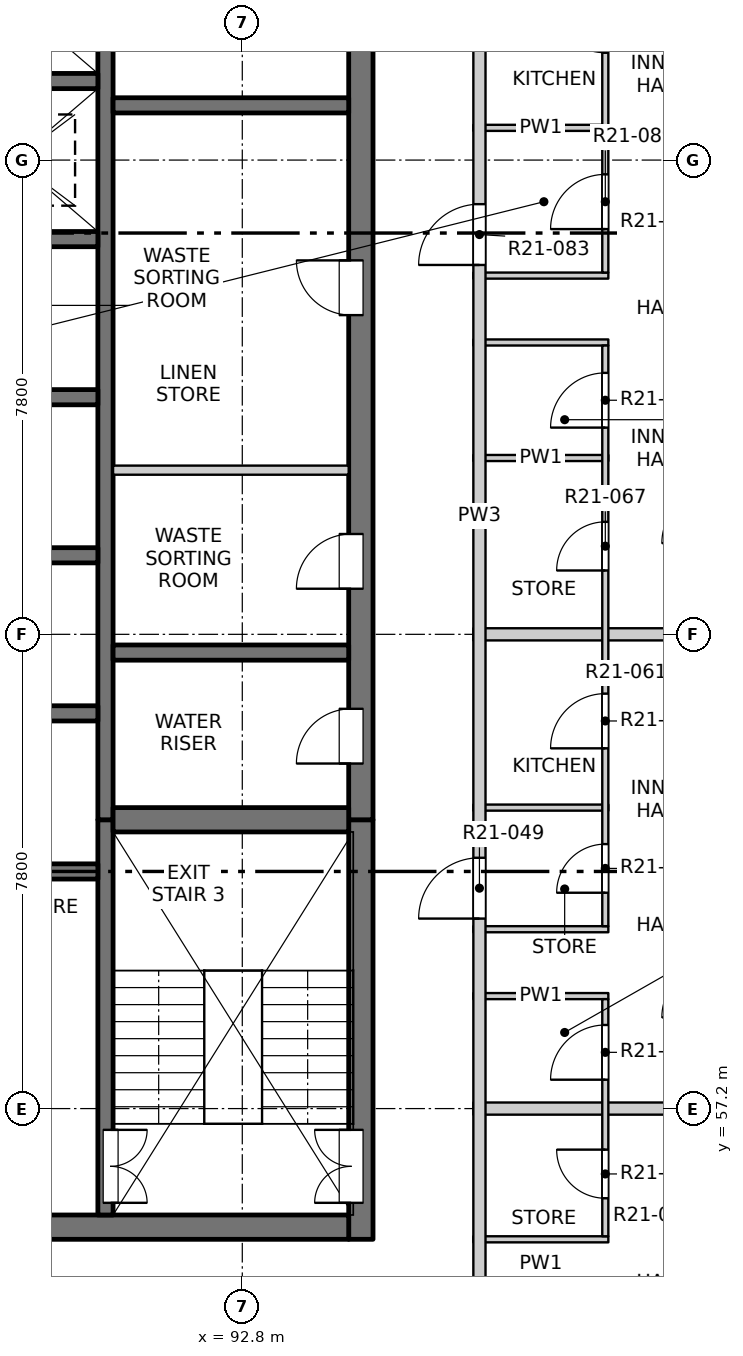
"""IFC4 building model, lengths in metres.
Left out: names, types, materials, properties, quantities, classifications, styles, units other than length and angle.
Written with IfcOpenShell. Run it as: python <this file> out.ifc"""

import sys

from ifc_helpers import new_model, si_unit, direction, frame, frame_2d, origin, place, context, subcontext, project, spatial, rectangle, extrude, element, fill, save


model = new_model("IFC4")
c1 = context("Model", 3, precision=1e-05, world=origin(), true_north=direction((0.0, 1.0)))
c2 = subcontext(c1, "Body", "Model", "MODEL_VIEW")
j1 = project(units=[si_unit("LENGTHUNIT", "METRE"), si_unit("PLANEANGLEUNIT", "RADIAN")], contexts=[c1])
p1 = place(None, origin())
s1 = spatial("IfcSite", under=j1, at=p1, CompositionType="ELEMENT")
p2 = place(p1, origin())
s2 = spatial("IfcBuilding", under=s1, at=p2, CompositionType="ELEMENT")
p3 = place(p2, frame((0.0, 0.0, 221.1)))
s3 = spatial("IfcBuildingStorey", under=s2, at=p3, CompositionType="ELEMENT", Elevation=221.1)
p4 = place(p3, frame((94.75, 55.05, -0.25), z_axis=(0.0, 0.0, 1.0), x_axis=(0.0, 1.0, 0.0)))
e1 = element("IfcWall", 1, at=p4, inside=s3, PredefinedType="SOLIDWALL", context=c2, shape_type="SweptSolid", body=[
    extrude(rectangle(XDim=6.9, YDim=0.4, at=frame_2d((3.45, 0.0))), origin(), (0.0, 0.0, 1.0), 3.4),
])
p5 = place(p4, frame((0.6, 0.0, 0.25)))
e2 = element("IfcOpeningElement", 2, at=p5, cuts=e1, PredefinedType="OPENING", context=c2, shape_type="SweptSolid", body=[
    extrude(rectangle(XDim=1.2, YDim=2.1, at=frame_2d((0.6, 1.05))), frame((0.0, 0.21, 0.0), z_axis=(0.0, -1.0, 0.0), x_axis=(1.0, 0.0, 0.0)), (0.0, 0.0, 1.0), 0.42),
])
p6 = place(p3, frame((94.75, 61.95, -0.25), z_axis=(0.0, 0.0, 1.0), x_axis=(0.0, 1.0, 0.0)))
e3 = element("IfcWall", 3, at=p6, inside=s3, PredefinedType="SOLIDWALL", context=c2, shape_type="SweptSolid", body=[
    extrude(rectangle(XDim=15.35, YDim=0.4, at=frame_2d((7.675, 0.0))), origin(), (0.0, 0.0, 1.0), 3.4),
])
p7 = place(p6, frame((0.925, 0.0, 0.25)))
e4 = element("IfcOpeningElement", 4, at=p7, cuts=e3, PredefinedType="OPENING", context=c2, shape_type="SweptSolid", body=[
    extrude(rectangle(XDim=0.9, YDim=2.1, at=frame_2d((0.45, 1.05))), frame((0.0, 0.21, 0.0), z_axis=(0.0, -1.0, 0.0), x_axis=(1.0, 0.0, 0.0)), (0.0, 0.0, 1.0), 0.42),
])
p8 = place(p6, frame((3.8, 0.0, 0.25)))
e5 = element("IfcOpeningElement", 5, at=p8, cuts=e3, PredefinedType="OPENING", context=c2, shape_type="SweptSolid", body=[
    extrude(rectangle(XDim=0.9, YDim=2.1, at=frame_2d((0.45, 1.05))), frame((0.0, 0.21, 0.0), z_axis=(0.0, -1.0, 0.0), x_axis=(1.0, 0.0, 0.0)), (0.0, 0.0, 1.0), 0.42),
])
p9 = place(p6, frame((8.3, 0.0, 0.25)))
e6 = element("IfcOpeningElement", 6, at=p9, cuts=e3, PredefinedType="OPENING", context=c2, shape_type="SweptSolid", body=[
    extrude(rectangle(XDim=0.9, YDim=2.1, at=frame_2d((0.45, 1.05))), frame((0.0, 0.21, 0.0), z_axis=(0.0, -1.0, 0.0), x_axis=(1.0, 0.0, 0.0)), (0.0, 0.0, 1.0), 0.42),
])
p10 = place(p6, frame((13.1, 0.0, 0.25)))
e7 = element("IfcOpeningElement", 7, at=p10, cuts=e3, PredefinedType="OPENING", context=c2, shape_type="SweptSolid", body=[
    extrude(rectangle(XDim=0.9, YDim=2.1, at=frame_2d((0.45, 1.05))), frame((0.0, 0.21, 0.0), z_axis=(0.0, -1.0, 0.0), x_axis=(1.0, 0.0, 0.0)), (0.0, 0.0, 1.0), 0.42),
])
p11 = place(p3, frame((75.45, 55.25, -0.25), z_axis=(0.0, 0.0, 1.0), x_axis=(1.0, 0.0, 0.0)))
e8 = element("IfcWall", 8, at=p11, inside=s3, PredefinedType="SOLIDWALL", context=c2, shape_type="SweptSolid", body=[
    extrude(rectangle(XDim=19.1, YDim=0.4, at=frame_2d((9.55, 0.0))), origin(), (0.0, 0.0, 1.0), 3.4),
])
p12 = place(p11, frame((8.8, 0.0, 0.25)))
e9 = element("IfcOpeningElement", 9, at=p12, cuts=e8, PredefinedType="OPENING", context=c2, shape_type="SweptSolid", body=[
    extrude(rectangle(XDim=1.5, YDim=2.1, at=frame_2d((0.75, 1.05))), frame((0.0, 0.21, 0.0), z_axis=(0.0, -1.0, 0.0), x_axis=(1.0, 0.0, 0.0)), (0.0, 0.0, 1.0), 0.42),
])
p13 = place(p3, frame((90.55, 55.45, -0.25), z_axis=(0.0, 0.0, 1.0), x_axis=(0.0, 1.0, 0.0)))
e10 = element("IfcWall", 10, at=p13, inside=s3, PredefinedType="SOLIDWALL", context=c2, shape_type="SweptSolid", body=[
    extrude(rectangle(XDim=6.5, YDim=0.25, at=frame_2d((3.25, 0.0))), origin(), (0.0, 0.0, 1.0), 3.4),
])
p14 = place(p13, frame((0.2, 0.0, 0.25)))
e11 = element("IfcOpeningElement", 11, at=p14, cuts=e10, PredefinedType="OPENING", context=c2, shape_type="SweptSolid", body=[
    extrude(rectangle(XDim=1.2, YDim=2.1, at=frame_2d((0.6, 1.05))), frame((0.0, 0.135, 0.0), z_axis=(0.0, -1.0, 0.0), x_axis=(1.0, 0.0, 0.0)), (0.0, 0.0, 1.0), 0.27),
])
p15 = place(p3, frame((90.55, 61.95, -0.25), z_axis=(0.0, 0.0, 1.0), x_axis=(0.0, 1.0, 0.0)))
e12 = element("IfcWall", 12, at=p15, inside=s3, PredefinedType="SOLIDWALL", context=c2, shape_type="SweptSolid", body=[
    extrude(rectangle(XDim=15.35, YDim=0.25, at=frame_2d((7.675, 0.0))), origin(), (0.0, 0.0, 1.0), 3.4),
])
for number, where, z_axis, x_axis in (
    (13, (87.425, 61.1, -0.25), (0.0, 0.0, 1.0), (1.0, 0.0, 0.0)),
    (14, (87.425, 63.7, -0.25), (0.0, 0.0, 1.0), (1.0, 0.0, 0.0)),
    (15, (87.425, 66.3, -0.25), (0.0, 0.0, 1.0), (1.0, 0.0, 0.0)),
    (16, (87.425, 68.9, -0.25), (0.0, 0.0, 1.0), (1.0, 0.0, 0.0)),
    (17, (87.425, 71.5, -0.25), (0.0, 0.0, 1.0), (1.0, 0.0, 0.0)),
    (18, (87.425, 74.1, -0.25), (0.0, 0.0, 1.0), (1.0, 0.0, 0.0)),
):
    element("IfcWall", number, at=place(p3, frame(where, z_axis=z_axis, x_axis=x_axis)), inside=s3, PredefinedType="SOLIDWALL", context=c2, shape_type="SweptSolid", body=[
        extrude(rectangle(XDim=3.0, YDim=0.25, at=frame_2d((1.5, 0.0))), origin(), (0.0, 0.0, 1.0), 3.4),
    ])
p16 = place(p3, frame((90.675, 61.95, -0.25), z_axis=(0.0, 0.0, 1.0), x_axis=(1.0, 0.0, 0.0)))
e19 = element("IfcWall", 19, at=p16, inside=s3, PredefinedType="SOLIDWALL", context=c2, shape_type="SweptSolid", body=[
    extrude(rectangle(XDim=3.875, YDim=0.4, at=frame_2d((1.938, 0.0))), origin(), (0.0, 0.0, 1.0), 3.4),
])
for number, where, z_axis, x_axis in (
    (20, (90.675, 64.7, -0.25), (0.0, 0.0, 1.0), (1.0, 0.0, 0.0)),
    (21, (90.675, 73.7, -0.25), (0.0, 0.0, 1.0), (1.0, 0.0, 0.0)),
):
    element("IfcWall", number, at=place(p3, frame(where, z_axis=z_axis, x_axis=x_axis)), inside=s3, PredefinedType="SOLIDWALL", context=c2, shape_type="SweptSolid", body=[
        extrude(rectangle(XDim=3.875, YDim=0.25, at=frame_2d((1.938, 0.0))), origin(), (0.0, 0.0, 1.0), 3.4),
    ])
p17 = place(p3, frame((96.6, 55.05, 0.0), z_axis=(0.0, 0.0, 1.0), x_axis=(1.0, 0.0, 0.0)))
e22 = element("IfcWall", 22, at=p17, inside=s3, PredefinedType="PARTITIONING", context=c2, shape_type="SweptSolid", body=[
    extrude(rectangle(XDim=2.22, YDim=0.1, at=frame_2d((1.11, 0.0))), origin(), (0.0, 0.0, 1.0), 3.15),
])
p18 = place(p3, frame((96.6, 57.2, 0.0), z_axis=(0.0, 0.0, 1.0), x_axis=(1.0, 0.0, 0.0)))
e23 = element("IfcWall", 23, at=p18, inside=s3, PredefinedType="PARTITIONING", context=c2, shape_type="SweptSolid", body=[
    extrude(rectangle(XDim=11.5, YDim=0.2, at=frame_2d((5.75, 0.0))), origin(), (0.0, 0.0, 1.0), 3.15),
])
for number, where, z_axis, x_axis in (
    (24, (96.6, 59.05, 0.0), (0.0, 0.0, 1.0), (1.0, 0.0, 0.0)),
    (25, (96.6, 60.15, 0.0), (0.0, 0.0, 1.0), (1.0, 0.0, 0.0)),
    (26, (96.6, 62.15, 0.0), (0.0, 0.0, 1.0), (1.0, 0.0, 0.0)),
):
    element("IfcWall", number, at=place(p3, frame(where, z_axis=z_axis, x_axis=x_axis)), inside=s3, PredefinedType="PARTITIONING", context=c2, shape_type="SweptSolid", body=[
        extrude(rectangle(XDim=2.22, YDim=0.1, at=frame_2d((1.11, 0.0))), origin(), (0.0, 0.0, 1.0), 3.15),
    ])
p19 = place(p3, frame((96.6, 65.0, 0.0), z_axis=(0.0, 0.0, 1.0), x_axis=(1.0, 0.0, 0.0)))
e27 = element("IfcWall", 27, at=p19, inside=s3, PredefinedType="PARTITIONING", context=c2, shape_type="SweptSolid", body=[
    extrude(rectangle(XDim=11.5, YDim=0.2, at=frame_2d((5.75, 0.0))), origin(), (0.0, 0.0, 1.0), 3.15),
])
p20 = place(p3, frame((90.675, 67.7, 0.0), z_axis=(0.0, 0.0, 1.0), x_axis=(1.0, 0.0, 0.0)))
e28 = element("IfcWall", 28, at=p20, inside=s3, PredefinedType="PARTITIONING", context=c2, shape_type="SweptSolid", body=[
    extrude(rectangle(XDim=3.875, YDim=0.15, at=frame_2d((1.938, 0.0))), origin(), (0.0, 0.0, 1.0), 3.15),
])
for number, where, z_axis, x_axis in (
    (29, (96.6, 67.9, 0.0), (0.0, 0.0, 1.0), (1.0, 0.0, 0.0)),
    (30, (96.6, 69.8, 0.0), (0.0, 0.0, 1.0), (1.0, 0.0, 0.0)),
    (31, (96.6, 70.9, 0.0), (0.0, 0.0, 1.0), (1.0, 0.0, 0.0)),
    (32, (96.6, 73.33, 0.0), (0.0, 0.0, 1.0), (1.0, 0.0, 0.0)),
):
    element("IfcWall", number, at=place(p3, frame(where, z_axis=z_axis, x_axis=x_axis)), inside=s3, PredefinedType="PARTITIONING", context=c2, shape_type="SweptSolid", body=[
        extrude(rectangle(XDim=2.22, YDim=0.1, at=frame_2d((1.11, 0.0))), origin(), (0.0, 0.0, 1.0), 3.15),
    ])
p21 = place(p3, frame((96.7, 49.5, 0.0), z_axis=(0.0, 0.0, 1.0), x_axis=(0.0, 1.0, 0.0)))
e33 = element("IfcWall", 33, at=p21, inside=s3, PredefinedType="PARTITIONING", context=c2, shape_type="SweptSolid", body=[
    extrude(rectangle(XDim=34.9, YDim=0.2, at=frame_2d((17.45, 0.0))), origin(), (0.0, 0.0, 1.0), 3.15),
])
p22 = place(p21, frame((3.275, 0.0, 0.0)))
e34 = element("IfcOpeningElement", 34, at=p22, cuts=e33, PredefinedType="OPENING", context=c2, shape_type="SweptSolid", body=[
    extrude(rectangle(XDim=1.0, YDim=2.1, at=frame_2d((0.5, 1.05))), frame((0.0, 0.11, 0.0), z_axis=(0.0, -1.0, 0.0), x_axis=(1.0, 0.0, 0.0)), (0.0, 0.0, 1.0), 0.22),
])
p23 = place(p21, frame((10.825, 0.0, 0.0)))
e35 = element("IfcOpeningElement", 35, at=p23, cuts=e33, PredefinedType="OPENING", context=c2, shape_type="SweptSolid", body=[
    extrude(rectangle(XDim=1.0, YDim=2.1, at=frame_2d((0.5, 1.05))), frame((0.0, 0.11, 0.0), z_axis=(0.0, -1.0, 0.0), x_axis=(1.0, 0.0, 0.0)), (0.0, 0.0, 1.0), 0.22),
])
p24 = place(p21, frame((21.575, 0.0, 0.0)))
e36 = element("IfcOpeningElement", 36, at=p24, cuts=e33, PredefinedType="OPENING", context=c2, shape_type="SweptSolid", body=[
    extrude(rectangle(XDim=1.0, YDim=2.1, at=frame_2d((0.5, 1.05))), frame((0.0, 0.11, 0.0), z_axis=(0.0, -1.0, 0.0), x_axis=(1.0, 0.0, 0.0)), (0.0, 0.0, 1.0), 0.22),
])
p25 = place(p21, frame((30.575, 0.0, 0.0)))
e37 = element("IfcOpeningElement", 37, at=p25, cuts=e33, PredefinedType="OPENING", context=c2, shape_type="SweptSolid", body=[
    extrude(rectangle(XDim=1.0, YDim=2.1, at=frame_2d((0.5, 1.05))), frame((0.0, 0.11, 0.0), z_axis=(0.0, -1.0, 0.0), x_axis=(1.0, 0.0, 0.0)), (0.0, 0.0, 1.0), 0.22),
])
p26 = place(p3, frame((98.77, 55.1, 0.0), z_axis=(0.0, 0.0, 1.0), x_axis=(0.0, 1.0, 0.0)))
e38 = element("IfcWall", 38, at=p26, inside=s3, PredefinedType="PARTITIONING", context=c2, shape_type="SweptSolid", body=[
    extrude(rectangle(XDim=3.9, YDim=0.1, at=frame_2d((1.95, 0.0))), origin(), (0.0, 0.0, 1.0), 3.15),
])
p27 = place(p26, frame((0.625, 0.0, 0.0)))
e39 = element("IfcOpeningElement", 39, at=p27, cuts=e38, PredefinedType="OPENING", context=c2, shape_type="SweptSolid", body=[
    extrude(rectangle(XDim=0.8, YDim=2.1, at=frame_2d((0.4, 1.05))), frame((0.0, 0.06, 0.0), z_axis=(0.0, -1.0, 0.0), x_axis=(1.0, 0.0, 0.0)), (0.0, 0.0, 1.0), 0.12),
])
p28 = place(p26, frame((2.575, 0.0, 0.0)))
e40 = element("IfcOpeningElement", 40, at=p28, cuts=e38, PredefinedType="OPENING", context=c2, shape_type="SweptSolid", body=[
    extrude(rectangle(XDim=0.9, YDim=2.1, at=frame_2d((0.45, 1.05))), frame((0.0, 0.06, 0.0), z_axis=(0.0, -1.0, 0.0), x_axis=(1.0, 0.0, 0.0)), (0.0, 0.0, 1.0), 0.12),
])
p29 = place(p3, frame((98.77, 60.2, 0.0), z_axis=(0.0, 0.0, 1.0), x_axis=(0.0, 1.0, 0.0)))
e41 = element("IfcWall", 41, at=p29, inside=s3, PredefinedType="PARTITIONING", context=c2, shape_type="SweptSolid", body=[
    extrude(rectangle(XDim=9.55, YDim=0.1, at=frame_2d((4.775, 0.0))), origin(), (0.0, 0.0, 1.0), 3.15),
])
p30 = place(p29, frame((0.55, 0.0, 0.0)))
e42 = element("IfcOpeningElement", 42, at=p30, cuts=e41, PredefinedType="OPENING", context=c2, shape_type="SweptSolid", body=[
    extrude(rectangle(XDim=0.8, YDim=2.1, at=frame_2d((0.4, 1.05))), frame((0.0, 0.06, 0.0), z_axis=(0.0, -1.0, 0.0), x_axis=(1.0, 0.0, 0.0)), (0.0, 0.0, 1.0), 0.12),
])
p31 = place(p29, frame((2.925, 0.0, 0.0)))
e43 = element("IfcOpeningElement", 43, at=p31, cuts=e41, PredefinedType="OPENING", context=c2, shape_type="SweptSolid", body=[
    extrude(rectangle(XDim=0.9, YDim=2.1, at=frame_2d((0.45, 1.05))), frame((0.0, 0.06, 0.0), z_axis=(0.0, -1.0, 0.0), x_axis=(1.0, 0.0, 0.0)), (0.0, 0.0, 1.0), 0.12),
])
p32 = place(p29, frame((5.85, 0.0, 0.0)))
e44 = element("IfcOpeningElement", 44, at=p32, cuts=e41, PredefinedType="OPENING", context=c2, shape_type="SweptSolid", body=[
    extrude(rectangle(XDim=0.8, YDim=2.1, at=frame_2d((0.4, 1.05))), frame((0.0, 0.06, 0.0), z_axis=(0.0, -1.0, 0.0), x_axis=(1.0, 0.0, 0.0)), (0.0, 0.0, 1.0), 0.12),
])
p33 = place(p29, frame((8.2, 0.0, 0.0)))
e45 = element("IfcOpeningElement", 45, at=p33, cuts=e41, PredefinedType="OPENING", context=c2, shape_type="SweptSolid", body=[
    extrude(rectangle(XDim=0.9, YDim=2.1, at=frame_2d((0.45, 1.05))), frame((0.0, 0.06, 0.0), z_axis=(0.0, -1.0, 0.0), x_axis=(1.0, 0.0, 0.0)), (0.0, 0.0, 1.0), 0.12),
])
p34 = place(p3, frame((98.77, 70.95, 0.0), z_axis=(0.0, 0.0, 1.0), x_axis=(0.0, 1.0, 0.0)))
e46 = element("IfcWall", 46, at=p34, inside=s3, PredefinedType="PARTITIONING", context=c2, shape_type="SweptSolid", body=[
    extrude(rectangle(XDim=7.8, YDim=0.1, at=frame_2d((3.9, 0.0))), origin(), (0.0, 0.0, 1.0), 3.15),
])
p35 = place(p34, frame((0.715, 0.0, 0.0)))
e47 = element("IfcOpeningElement", 47, at=p35, cuts=e46, PredefinedType="OPENING", context=c2, shape_type="SweptSolid", body=[
    extrude(rectangle(XDim=0.9, YDim=2.1, at=frame_2d((0.45, 1.05))), frame((0.0, 0.06, 0.0), z_axis=(0.0, -1.0, 0.0), x_axis=(1.0, 0.0, 0.0)), (0.0, 0.0, 1.0), 0.12),
])
p36 = place(p34, frame((3.615, 0.0, 0.0)))
e48 = element("IfcOpeningElement", 48, at=p36, cuts=e46, PredefinedType="OPENING", context=c2, shape_type="SweptSolid", body=[
    extrude(rectangle(XDim=0.9, YDim=2.1, at=frame_2d((0.45, 1.05))), frame((0.0, 0.06, 0.0), z_axis=(0.0, -1.0, 0.0), x_axis=(1.0, 0.0, 0.0)), (0.0, 0.0, 1.0), 0.12),
])
p37 = place(p34, frame((6.35, 0.0, 0.0)))
e49 = element("IfcOpeningElement", 49, at=p37, cuts=e46, PredefinedType="OPENING", context=c2, shape_type="SweptSolid", body=[
    extrude(rectangle(XDim=0.9, YDim=2.1, at=frame_2d((0.45, 1.05))), frame((0.0, 0.06, 0.0), z_axis=(0.0, -1.0, 0.0), x_axis=(1.0, 0.0, 0.0)), (0.0, 0.0, 1.0), 0.12),
])
p38 = place(p27, origin())
e50 = element("IfcDoor", 50, at=p38, inside=s3, OperationType="SINGLE_SWING_RIGHT", PredefinedType="DOOR", context=c2, shape_type="SweptSolid", body=[
    extrude(rectangle(XDim=0.8, YDim=2.1, at=frame_2d((0.4, 1.05))), frame((0.0, 0.025, 0.0), z_axis=(0.0, -1.0, 0.0), x_axis=(1.0, 0.0, 0.0)), (0.0, 0.0, 1.0), 0.05),
])
fill(e39, e50)
p39 = place(p14, origin())
e51 = element("IfcDoor", 51, at=p39, inside=s3, OperationType="DOUBLE_DOOR_SINGLE_SWING", PredefinedType="DOOR", context=c2, shape_type="SweptSolid", body=[
    extrude(rectangle(XDim=1.2, YDim=2.1, at=frame_2d((0.6, 1.05))), frame((0.0, -0.06, 0.0), z_axis=(0.0, -1.0, 0.0), x_axis=(1.0, 0.0, 0.0)), (0.0, 0.0, 1.0), 0.05),
])
fill(e11, e51)
p40 = place(p5, origin())
e52 = element("IfcDoor", 52, at=p40, inside=s3, OperationType="DOUBLE_DOOR_SINGLE_SWING", PredefinedType="DOOR", context=c2, shape_type="SweptSolid", body=[
    extrude(rectangle(XDim=1.2, YDim=2.1, at=frame_2d((0.6, 1.05))), frame((0.0, 0.185, 0.0), z_axis=(0.0, -1.0, 0.0), x_axis=(1.0, 0.0, 0.0)), (0.0, 0.0, 1.0), 0.05),
])
fill(e2, e52)
p41 = place(p28, origin())
e53 = element("IfcDoor", 53, at=p41, inside=s3, OperationType="SINGLE_SWING_LEFT", PredefinedType="DOOR", context=c2, shape_type="SweptSolid", body=[
    extrude(rectangle(XDim=0.9, YDim=2.1, at=frame_2d((0.45, 1.05))), frame((0.0, 0.025, 0.0), z_axis=(0.0, -1.0, 0.0), x_axis=(1.0, 0.0, 0.0)), (0.0, 0.0, 1.0), 0.05),
])
fill(e40, e53)
p42 = place(p23, origin())
e54 = element("IfcDoor", 54, at=p42, inside=s3, OperationType="SINGLE_SWING_LEFT", PredefinedType="DOOR", context=c2, shape_type="SweptSolid", body=[
    extrude(rectangle(XDim=1.0, YDim=2.1, at=frame_2d((0.5, 1.05))), frame((0.0, 0.025, 0.0), z_axis=(0.0, -1.0, 0.0), x_axis=(1.0, 0.0, 0.0)), (0.0, 0.0, 1.0), 0.05),
])
fill(e35, e54)
p43 = place(p30, origin())
e55 = element("IfcDoor", 55, at=p43, inside=s3, OperationType="SINGLE_SWING_LEFT", PredefinedType="DOOR", context=c2, shape_type="SweptSolid", body=[
    extrude(rectangle(XDim=0.8, YDim=2.1, at=frame_2d((0.4, 1.05))), frame((0.0, 0.025, 0.0), z_axis=(0.0, -1.0, 0.0), x_axis=(1.0, 0.0, 0.0)), (0.0, 0.0, 1.0), 0.05),
])
fill(e42, e55)
p44 = place(p7, origin())
e56 = element("IfcDoor", 56, at=p44, inside=s3, OperationType="SINGLE_SWING_LEFT", PredefinedType="DOOR", context=c2, shape_type="SweptSolid", body=[
    extrude(rectangle(XDim=0.9, YDim=2.1, at=frame_2d((0.45, 1.05))), frame((0.0, 0.185, 0.0), z_axis=(0.0, -1.0, 0.0), x_axis=(1.0, 0.0, 0.0)), (0.0, 0.0, 1.0), 0.05),
])
fill(e4, e56)
p45 = place(p31, origin())
e57 = element("IfcDoor", 57, at=p45, inside=s3, OperationType="SINGLE_SWING_LEFT", PredefinedType="DOOR", context=c2, shape_type="SweptSolid", body=[
    extrude(rectangle(XDim=0.9, YDim=2.1, at=frame_2d((0.45, 1.05))), frame((0.0, 0.025, 0.0), z_axis=(0.0, -1.0, 0.0), x_axis=(1.0, 0.0, 0.0)), (0.0, 0.0, 1.0), 0.05),
])
fill(e43, e57)
p46 = place(p8, origin())
e58 = element("IfcDoor", 58, at=p46, inside=s3, OperationType="SINGLE_SWING_LEFT", PredefinedType="DOOR", context=c2, shape_type="SweptSolid", body=[
    extrude(rectangle(XDim=0.9, YDim=2.1, at=frame_2d((0.45, 1.05))), frame((0.0, 0.185, 0.0), z_axis=(0.0, -1.0, 0.0), x_axis=(1.0, 0.0, 0.0)), (0.0, 0.0, 1.0), 0.05),
])
fill(e5, e58)
p47 = place(p32, origin())
e59 = element("IfcDoor", 59, at=p47, inside=s3, OperationType="SINGLE_SWING_LEFT", PredefinedType="DOOR", context=c2, shape_type="SweptSolid", body=[
    extrude(rectangle(XDim=0.8, YDim=2.1, at=frame_2d((0.4, 1.05))), frame((0.0, 0.025, 0.0), z_axis=(0.0, -1.0, 0.0), x_axis=(1.0, 0.0, 0.0)), (0.0, 0.0, 1.0), 0.05),
])
fill(e44, e59)
p48 = place(p33, origin())
e60 = element("IfcDoor", 60, at=p48, inside=s3, OperationType="SINGLE_SWING_LEFT", PredefinedType="DOOR", context=c2, shape_type="SweptSolid", body=[
    extrude(rectangle(XDim=0.9, YDim=2.1, at=frame_2d((0.45, 1.05))), frame((0.0, 0.025, 0.0), z_axis=(0.0, -1.0, 0.0), x_axis=(1.0, 0.0, 0.0)), (0.0, 0.0, 1.0), 0.05),
])
fill(e45, e60)
p49 = place(p9, origin())
e61 = element("IfcDoor", 61, at=p49, inside=s3, OperationType="SINGLE_SWING_RIGHT", PredefinedType="DOOR", context=c2, shape_type="SweptSolid", body=[
    extrude(rectangle(XDim=0.9, YDim=2.1, at=frame_2d((0.45, 1.05))), frame((0.0, 0.185, 0.0), z_axis=(0.0, -1.0, 0.0), x_axis=(1.0, 0.0, 0.0)), (0.0, 0.0, 1.0), 0.05),
])
fill(e6, e61)
p50 = place(p24, origin())
e62 = element("IfcDoor", 62, at=p50, inside=s3, OperationType="SINGLE_SWING_LEFT", PredefinedType="DOOR", context=c2, shape_type="SweptSolid", body=[
    extrude(rectangle(XDim=1.0, YDim=2.1, at=frame_2d((0.5, 1.05))), frame((0.0, 0.025, 0.0), z_axis=(0.0, -1.0, 0.0), x_axis=(1.0, 0.0, 0.0)), (0.0, 0.0, 1.0), 0.05),
])
fill(e36, e62)
p51 = place(p35, origin())
e63 = element("IfcDoor", 63, at=p51, inside=s3, OperationType="SINGLE_SWING_LEFT", PredefinedType="DOOR", context=c2, shape_type="SweptSolid", body=[
    extrude(rectangle(XDim=0.9, YDim=2.1, at=frame_2d((0.45, 1.05))), frame((0.0, 0.025, 0.0), z_axis=(0.0, -1.0, 0.0), x_axis=(1.0, 0.0, 0.0)), (0.0, 0.0, 1.0), 0.05),
])
fill(e47, e63)
p52 = place(p36, origin())
e64 = element("IfcDoor", 64, at=p52, inside=s3, OperationType="SINGLE_SWING_RIGHT", PredefinedType="DOOR", context=c2, shape_type="SweptSolid", body=[
    extrude(rectangle(XDim=0.9, YDim=2.1, at=frame_2d((0.45, 1.05))), frame((0.0, 0.025, 0.0), z_axis=(0.0, -1.0, 0.0), x_axis=(1.0, 0.0, 0.0)), (0.0, 0.0, 1.0), 0.05),
])
fill(e48, e64)
save(model, sys.argv[1])
